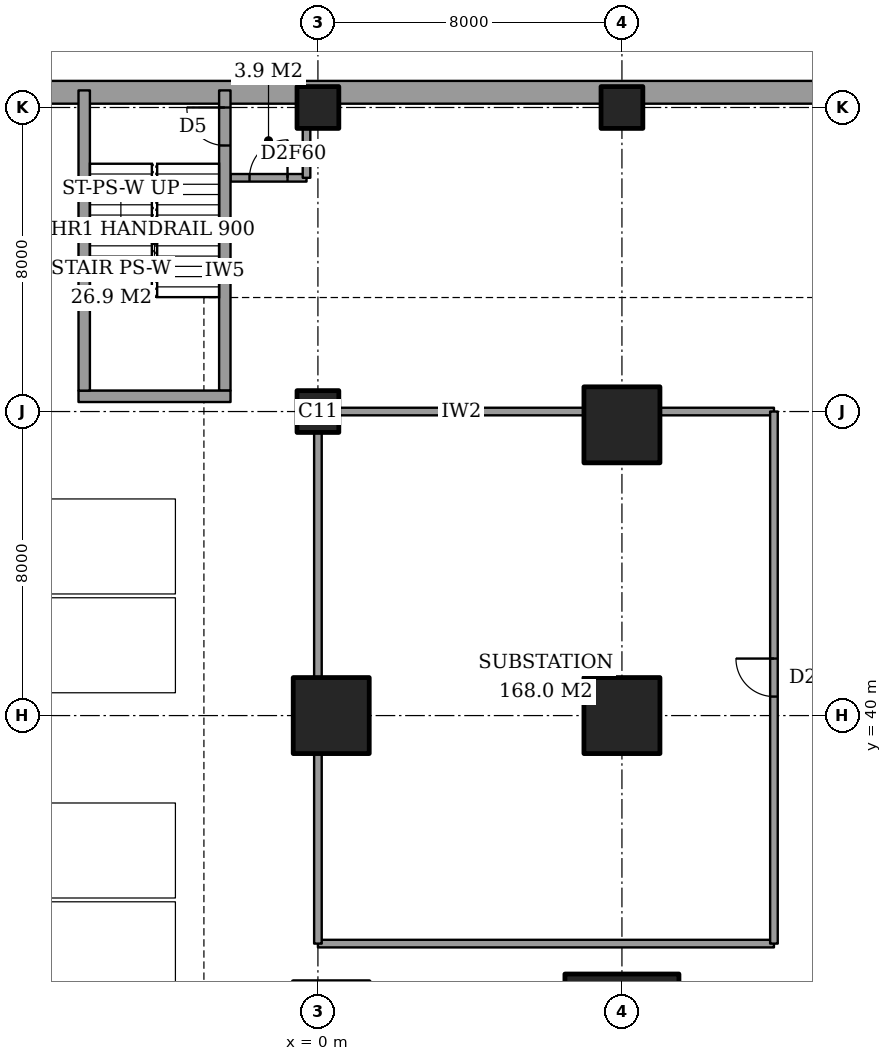
"""IFC4 building model, lengths in metres.
Left out: names, types, materials, properties, quantities, classifications, styles, units other than length and angle.
Written with IfcOpenShell. Run it as: python <this file> out.ifc"""

import sys

from ifc_helpers import new_model, si_unit, direction, frame, frame_2d, origin, origin_2d, place, context, subcontext, project, spatial, rectangle, extrude, element, fill, save


model = new_model("IFC4")
c1 = context("Model", 3, precision=1e-05, world=origin(), true_north=direction((0.0, 1.0)))
c2 = subcontext(c1, "Body", "Model", "MODEL_VIEW")
j1 = project(units=[si_unit("LENGTHUNIT", "METRE"), si_unit("PLANEANGLEUNIT", "RADIAN")], contexts=[c1])
p1 = place(None, origin())
s1 = spatial("IfcSite", under=j1, at=p1, CompositionType="ELEMENT")
p2 = place(p1, origin())
s2 = spatial("IfcBuilding", under=s1, at=p2, CompositionType="ELEMENT")
p3 = place(p2, frame((0.0, 0.0, -5.0)))
s3 = spatial("IfcBuildingStorey", under=s2, at=p3, CompositionType="ELEMENT", Elevation=-5.0)
p4 = place(p3, frame((-16.7, 56.4, -0.4), z_axis=(0.0, 0.0, 1.0), x_axis=(1.0, 0.0, 0.0)))
e1 = element("IfcWall", 1, at=p4, inside=s3, PredefinedType="USERDEFINED", context=c2, shape_type="SweptSolid", body=[
    extrude(rectangle(XDim=92.2, YDim=0.6, at=frame_2d((46.1, 0.0))), origin(), (0.0, 0.0, 1.0), 5.4),
])
p5 = place(p3, frame((0.35, 40.0, 0.0), z_axis=(0.0, 0.0, 1.0), x_axis=(1.0, 0.0, 0.0)))
e2 = element("IfcColumn", 2, at=p5, inside=s3, PredefinedType="COLUMN", context=c2, shape_type="SweptSolid", body=[
    extrude(rectangle(XDim=2.0, YDim=2.0, at=origin_2d()), origin(), (0.0, 0.0, 1.0), 5.0),
])
p6 = place(p3, frame((0.0, 48.0, 0.0), z_axis=(0.0, 0.0, 1.0), x_axis=(1.0, 0.0, 0.0)))
e3 = element("IfcColumn", 3, at=p6, inside=s3, PredefinedType="COLUMN", context=c2, shape_type="SweptSolid", body=[
    extrude(rectangle(XDim=1.1, YDim=1.1, at=origin_2d()), origin(), (0.0, 0.0, 1.0), 5.0),
])
p7 = place(p3, frame((0.0, 56.0, -0.4), z_axis=(0.0, 0.0, 1.0), x_axis=(1.0, 0.0, 0.0)))
e4 = element("IfcColumn", 4, at=p7, inside=s3, PredefinedType="COLUMN", context=c2, shape_type="SweptSolid", body=[
    extrude(rectangle(XDim=1.1, YDim=1.1, at=origin_2d()), origin(), (0.0, 0.0, 1.0), 5.4),
])
p8 = place(p3, frame((8.0, 32.0, 0.0), z_axis=(0.0, 0.0, 1.0), x_axis=(1.0, 0.0, 0.0)))
e5 = element("IfcColumn", 5, at=p8, inside=s3, PredefinedType="COLUMN", context=c2, shape_type="SweptSolid", body=[
    extrude(rectangle(XDim=3.0, YDim=2.4, at=origin_2d()), origin(), (0.0, 0.0, 1.0), 5.0),
])
for number, where, z_axis, x_axis in (
    (6, (8.0, 40.0, 0.0), (0.0, 0.0, 1.0), (1.0, 0.0, 0.0)),
    (7, (8.0, 47.65, 0.0), (0.0, 0.0, 1.0), (1.0, 0.0, 0.0)),
):
    element("IfcColumn", number, at=place(p3, frame(where, z_axis=z_axis, x_axis=x_axis)), inside=s3, PredefinedType="COLUMN", context=c2, shape_type="SweptSolid", body=[
        extrude(rectangle(XDim=2.0, YDim=2.0, at=origin_2d()), origin(), (0.0, 0.0, 1.0), 5.0),
    ])
p9 = place(p3, frame((8.0, 56.0, -0.4), z_axis=(0.0, 0.0, 1.0), x_axis=(1.0, 0.0, 0.0)))
e8 = element("IfcColumn", 8, at=p9, inside=s3, PredefinedType="COLUMN", context=c2, shape_type="SweptSolid", body=[
    extrude(rectangle(XDim=1.1, YDim=1.1, at=origin_2d()), origin(), (0.0, 0.0, 1.0), 5.4),
])
p10 = place(p3, frame((0.0, 34.0, 0.0), z_axis=(0.0, 0.0, 1.0), x_axis=(1.0, 0.0, 0.0)))
e9 = element("IfcWall", 9, at=p10, inside=s3, PredefinedType="PARTITIONING", context=c2, shape_type="SweptSolid", body=[
    extrude(rectangle(XDim=12.0, YDim=0.2, at=frame_2d((6.0, 0.0))), origin(), (0.0, 0.0, 1.0), 4.7),
])
p11 = place(p3, frame((0.55, 48.0, 0.0), z_axis=(0.0, 0.0, 1.0), x_axis=(1.0, 0.0, 0.0)))
e10 = element("IfcWall", 10, at=p11, inside=s3, PredefinedType="PARTITIONING", context=c2, shape_type="SweptSolid", body=[
    extrude(rectangle(XDim=6.45, YDim=0.2, at=frame_2d((3.225, 0.0))), origin(), (0.0, 0.0, 1.0), 3.3),
])
p12 = place(p3, frame((9.0, 48.0, 0.0), z_axis=(0.0, 0.0, 1.0), x_axis=(1.0, 0.0, 0.0)))
e11 = element("IfcWall", 11, at=p12, inside=s3, PredefinedType="PARTITIONING", context=c2, shape_type="SweptSolid", body=[
    extrude(rectangle(XDim=3.0, YDim=0.2, at=frame_2d((1.5, 0.0))), origin(), (0.0, 0.0, 1.0), 3.3),
])
p13 = place(p3, frame((-2.3, 54.15, 0.0), z_axis=(0.0, 0.0, 1.0), x_axis=(1.0, 0.0, 0.0)))
e12 = element("IfcWall", 12, at=p13, inside=s3, PredefinedType="PARTITIONING", context=c2, shape_type="SweptSolid", body=[
    extrude(rectangle(XDim=2.0, YDim=0.2, at=frame_2d((1.0, 0.0))), origin(), (0.0, 0.0, 1.0), 4.7),
])
p14 = place(p13, frame((0.5, 0.0, 0.0)))
e13 = element("IfcOpeningElement", 13, at=p14, cuts=e12, PredefinedType="OPENING", context=c2, shape_type="SweptSolid", body=[
    extrude(rectangle(XDim=1.0, YDim=2.1, at=frame_2d((0.5, 1.05))), frame((0.0, 0.11, 0.0), z_axis=(0.0, -1.0, 0.0), x_axis=(1.0, 0.0, 0.0)), (0.0, 0.0, 1.0), 0.22),
])
p15 = place(p3, frame((-0.3, 54.15, 0.0), z_axis=(0.0, 0.0, 1.0), x_axis=(0.0, 1.0, 0.0)))
e14 = element("IfcWall", 14, at=p15, inside=s3, PredefinedType="PARTITIONING", context=c2, shape_type="SweptSolid", body=[
    extrude(rectangle(XDim=1.3, YDim=0.2, at=frame_2d((0.65, 0.0))), origin(), (0.0, 0.0, 1.0), 3.3),
])
p16 = place(p3, frame((0.0, 34.0, 0.0), z_axis=(0.0, 0.0, 1.0), x_axis=(0.0, 1.0, 0.0)))
e15 = element("IfcWall", 15, at=p16, inside=s3, PredefinedType="PARTITIONING", context=c2, shape_type="SweptSolid", body=[
    extrude(rectangle(XDim=5.0, YDim=0.2, at=frame_2d((2.5, 0.0))), origin(), (0.0, 0.0, 1.0), 3.3),
])
p17 = place(p3, frame((0.0, 41.0, 0.0), z_axis=(0.0, 0.0, 1.0), x_axis=(0.0, 1.0, 0.0)))
e16 = element("IfcWall", 16, at=p17, inside=s3, PredefinedType="PARTITIONING", context=c2, shape_type="SweptSolid", body=[
    extrude(rectangle(XDim=6.45, YDim=0.2, at=frame_2d((3.225, 0.0))), origin(), (0.0, 0.0, 1.0), 3.3),
])
p18 = place(p3, frame((12.0, 34.0, 0.0), z_axis=(0.0, 0.0, 1.0), x_axis=(0.0, 1.0, 0.0)))
e17 = element("IfcWall", 17, at=p18, inside=s3, PredefinedType="PARTITIONING", context=c2, shape_type="SweptSolid", body=[
    extrude(rectangle(XDim=14.0, YDim=0.2, at=frame_2d((7.0, 0.0))), origin(), (0.0, 0.0, 1.0), 4.7),
])
p19 = place(p18, frame((6.5, 0.0, 0.0)))
e18 = element("IfcOpeningElement", 18, at=p19, cuts=e17, PredefinedType="OPENING", context=c2, shape_type="SweptSolid", body=[
    extrude(rectangle(XDim=1.0, YDim=2.1, at=frame_2d((0.5, 1.05))), frame((0.0, 0.11, 0.0), z_axis=(0.0, -1.0, 0.0), x_axis=(1.0, 0.0, 0.0)), (0.0, 0.0, 1.0), 0.22),
])
p20 = place(p3, frame((-6.3, 48.4, 0.0), z_axis=(0.0, 0.0, 1.0), x_axis=(1.0, 0.0, 0.0)))
e19 = element("IfcWall", 19, at=p20, inside=s3, PredefinedType="PARTITIONING", context=c2, shape_type="SweptSolid", body=[
    extrude(rectangle(XDim=4.0, YDim=0.3, at=frame_2d((2.0, 0.0))), origin(), (0.0, 0.0, 1.0), 5.0),
])
p21 = place(p3, frame((-6.15, 48.55, 0.0), z_axis=(0.0, 0.0, 1.0), x_axis=(0.0, 1.0, 0.0)))
e20 = element("IfcWall", 20, at=p21, inside=s3, PredefinedType="PARTITIONING", context=c2, shape_type="SweptSolid", body=[
    extrude(rectangle(XDim=7.9, YDim=0.3, at=frame_2d((3.95, 0.0))), origin(), (0.0, 0.0, 1.0), 5.0),
])
p22 = place(p3, frame((-2.45, 48.55, 0.0), z_axis=(0.0, 0.0, 1.0), x_axis=(0.0, 1.0, 0.0)))
e21 = element("IfcWall", 21, at=p22, inside=s3, PredefinedType="PARTITIONING", context=c2, shape_type="SweptSolid", body=[
    extrude(rectangle(XDim=7.9, YDim=0.3, at=frame_2d((3.95, 0.0))), origin(), (0.0, 0.0, 1.0), 5.0),
])
p23 = place(p22, frame((6.45, 0.0, 0.0)))
e22 = element("IfcOpeningElement", 22, at=p23, cuts=e21, PredefinedType="OPENING", context=c2, shape_type="SweptSolid", body=[
    extrude(rectangle(XDim=1.0, YDim=2.1, at=frame_2d((0.5, 1.05))), frame((0.0, 0.16, 0.0), z_axis=(0.0, -1.0, 0.0), x_axis=(1.0, 0.0, 0.0)), (0.0, 0.0, 1.0), 0.32),
])
p24 = place(p19, origin())
e23 = element("IfcDoor", 23, at=p24, inside=s3, OperationType="SINGLE_SWING_LEFT", PredefinedType="DOOR", context=c2, shape_type="SweptSolid", body=[
    extrude(rectangle(XDim=1.0, YDim=2.1, at=frame_2d((0.5, 1.05))), frame((0.0, 0.025, 0.0), z_axis=(0.0, -1.0, 0.0), x_axis=(1.0, 0.0, 0.0)), (0.0, 0.0, 1.0), 0.05),
])
fill(e18, e23)
p25 = place(p14, origin())
e24 = element("IfcDoor", 24, at=p25, inside=s3, OperationType="SINGLE_SWING_LEFT", PredefinedType="DOOR", context=c2, shape_type="SweptSolid", body=[
    extrude(rectangle(XDim=1.0, YDim=2.1, at=frame_2d((0.5, 1.05))), frame((0.0, 0.025, 0.0), z_axis=(0.0, -1.0, 0.0), x_axis=(1.0, 0.0, 0.0)), (0.0, 0.0, 1.0), 0.05),
])
fill(e13, e24)
p26 = place(p23, origin())
e25 = element("IfcDoor", 25, at=p26, inside=s3, OperationType="SINGLE_SWING_LEFT", PredefinedType="DOOR", context=c2, shape_type="SweptSolid", body=[
    extrude(rectangle(XDim=1.0, YDim=2.1, at=frame_2d((0.5, 1.05))), frame((0.0, 0.025, 0.0), z_axis=(0.0, -1.0, 0.0), x_axis=(1.0, 0.0, 0.0)), (0.0, 0.0, 1.0), 0.05),
])
fill(e22, e25)
save(model, sys.argv[1])
